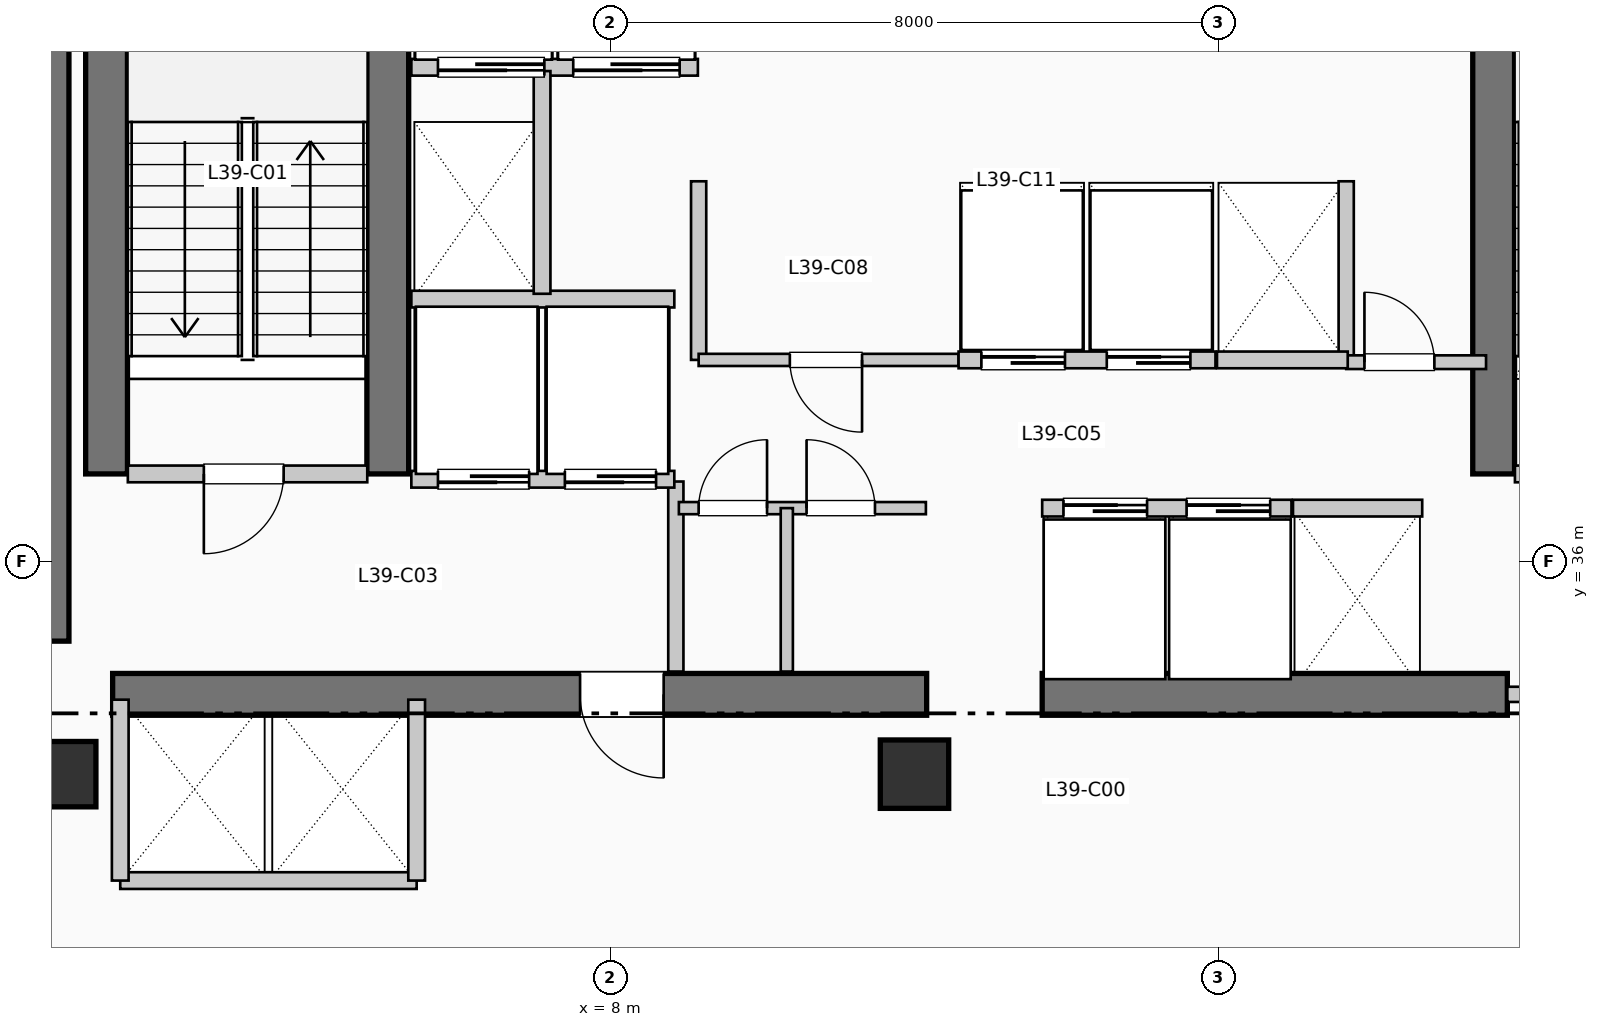
"""IFC4 building model, lengths in metres.
Left out: names, types, materials, properties, quantities, classifications, styles, units other than length and angle.
Written with IfcOpenShell. Run it as: python <this file> out.ifc"""

import sys

from ifc_helpers import new_model, si_unit, direction, frame, frame_2d, origin, origin_2d, place, context, subcontext, project, spatial, rectangle, extrude, element, fill, save


model = new_model("IFC4")
c1 = context("Model", 3, precision=1e-05, world=origin(), true_north=direction((0.0, 1.0)))
c2 = subcontext(c1, "Body", "Model", "MODEL_VIEW")
j1 = project(units=[si_unit("LENGTHUNIT", "METRE"), si_unit("PLANEANGLEUNIT", "RADIAN")], contexts=[c1])
p1 = place(None, origin())
s1 = spatial("IfcSite", under=j1, at=p1, CompositionType="ELEMENT")
p2 = place(p1, origin())
s2 = spatial("IfcBuilding", under=s1, at=p2, CompositionType="ELEMENT")
p3 = place(p2, frame((0.0, 0.0, 162.69)))
s3 = spatial("IfcBuildingStorey", under=s2, at=p3, CompositionType="ELEMENT", Elevation=162.69)
p4 = place(p3, frame((0.5, 34.95, 0.0), z_axis=(0.0, 0.0, 1.0), x_axis=(0.0, 1.0, 0.0)))
e1 = element("IfcWall", 1, at=p4, inside=s3, PredefinedType="SHEAR", context=c2, shape_type="SweptSolid", body=[
    extrude(rectangle(XDim=7.9, YDim=0.75, at=frame_2d((3.95, 0.0))), origin(), (0.0, 0.0, 1.0), 3.96),
])
p5 = place(p3, frame((1.45, 34.25, 0.0), z_axis=(0.0, 0.0, 1.0), x_axis=(1.0, 0.0, 0.0)))
e2 = element("IfcWall", 2, at=p5, inside=s3, PredefinedType="SHEAR", context=c2, shape_type="SweptSolid", body=[
    extrude(rectangle(XDim=10.71, YDim=0.55, at=frame_2d((5.355, 0.0))), origin(), (0.0, 0.0, 1.0), 3.96),
])
p6 = place(p5, frame((7.25, 0.0, 0.0), z_axis=(0.0, 0.0, 1.0), x_axis=(-1.0, 0.0, 0.0)))
e3 = element("IfcOpeningElement", 3, at=p6, cuts=e2, PredefinedType="OPENING", context=c2, shape_type="SweptSolid", body=[
    extrude(rectangle(XDim=1.1, YDim=2.15, at=frame_2d((0.55, 1.075))), frame((0.0, 0.285, 0.0), z_axis=(0.0, -1.0, 0.0), x_axis=(1.0, 0.0, 0.0)), (0.0, 0.0, 1.0), 0.57),
])
p7 = place(p3, frame((13.68, 34.25, 0.0), z_axis=(0.0, 0.0, 1.0), x_axis=(1.0, 0.0, 0.0)))
e4 = element("IfcWall", 4, at=p7, inside=s3, PredefinedType="SHEAR", context=c2, shape_type="SweptSolid", body=[
    extrude(rectangle(XDim=6.12, YDim=0.55, at=frame_2d((3.06, 0.0))), origin(), (0.0, 0.0, 1.0), 3.96),
])
for number, where, z_axis, x_axis in (
    (5, (1.37, 37.15, 0.0), (0.0, 0.0, 1.0), (0.0, 1.0, 0.0)),
    (6, (5.07, 37.15, 0.0), (0.0, 0.0, 1.0), (0.0, 1.0, 0.0)),
    (7, (19.62, 37.15, 0.0), (0.0, 0.0, 1.0), (0.0, 1.0, 0.0)),
):
    element("IfcWall", number, at=place(p3, frame(where, z_axis=z_axis, x_axis=x_axis)), inside=s3, PredefinedType="SHEAR", context=c2, shape_type="SweptSolid", body=[
        extrude(rectangle(XDim=7.89, YDim=0.55, at=frame_2d((3.945, 0.0))), origin(), (0.0, 0.0, 1.0), 3.96),
    ])
p8 = place(p3, frame((0.8, 33.2, 0.0), z_axis=(0.0, 0.0, 1.0), x_axis=(1.0, 0.0, 0.0)))
e8 = element("IfcColumn", 8, at=p8, inside=s3, PredefinedType="COLUMN", context=c2, shape_type="SweptSolid", body=[
    extrude(rectangle(XDim=0.86, YDim=0.86, at=origin_2d()), origin(), (0.0, 0.0, 1.0), 3.96),
])
p9 = place(p3, frame((12.0, 33.2, 0.0), z_axis=(0.0, 0.0, 1.0), x_axis=(1.0, 0.0, 0.0)))
e9 = element("IfcColumn", 9, at=p9, inside=s3, PredefinedType="COLUMN", context=c2, shape_type="SweptSolid", body=[
    extrude(rectangle(XDim=0.9, YDim=0.9, at=origin_2d()), origin(), (0.0, 0.0, 1.0), 3.96),
])
p10 = place(p3, frame((1.65, 37.15, 0.0), z_axis=(0.0, 0.0, 1.0), x_axis=(1.0, 0.0, 0.0)))
e10 = element("IfcWall", 10, at=p10, inside=s3, PredefinedType="PARTITIONING", context=c2, shape_type="SweptSolid", body=[
    extrude(rectangle(XDim=3.15, YDim=0.22, at=frame_2d((1.575, 0.0))), origin(), (0.0, 0.0, 1.0), 3.71),
])
p11 = place(p10, frame((2.05, 0.0, 0.0), z_axis=(0.0, 0.0, 1.0), x_axis=(-1.0, 0.0, 0.0)))
e11 = element("IfcOpeningElement", 11, at=p11, cuts=e10, PredefinedType="OPENING", context=c2, shape_type="SweptSolid", body=[
    extrude(rectangle(XDim=1.05, YDim=2.15, at=frame_2d((0.525, 1.075))), frame((0.0, 0.12, 0.0), z_axis=(0.0, -1.0, 0.0), x_axis=(1.0, 0.0, 0.0)), (0.0, 0.0, 1.0), 0.24),
])
p12 = place(p3, frame((8.86, 34.55, 0.0), z_axis=(0.0, 0.0, 1.0), x_axis=(0.0, 1.0, 0.0)))
e12 = element("IfcWall", 12, at=p12, inside=s3, PredefinedType="PARTITIONING", context=c2, shape_type="SweptSolid", body=[
    extrude(rectangle(XDim=2.5, YDim=0.2, at=frame_2d((1.25, 0.0))), origin(), (0.0, 0.0, 1.0), 3.71),
])
p13 = place(p3, frame((19.9, 37.15, 0.0), z_axis=(0.0, 0.0, 1.0), x_axis=(1.0, 0.0, 0.0)))
e13 = element("IfcWall", 13, at=p13, inside=s3, PredefinedType="PARTITIONING", context=c2, shape_type="SweptSolid", body=[
    extrude(rectangle(XDim=3.15, YDim=0.22, at=frame_2d((1.575, 0.0))), origin(), (0.0, 0.0, 1.0), 3.71),
])
p14 = place(p13, frame((2.05, 0.0, 0.0), z_axis=(0.0, 0.0, 1.0), x_axis=(-1.0, 0.0, 0.0)))
e14 = element("IfcOpeningElement", 14, at=p14, cuts=e13, PredefinedType="OPENING", context=c2, shape_type="SweptSolid", body=[
    extrude(rectangle(XDim=1.05, YDim=2.15, at=frame_2d((0.525, 1.075))), frame((0.0, 0.12, 0.0), z_axis=(0.0, -1.0, 0.0), x_axis=(1.0, 0.0, 0.0)), (0.0, 0.0, 1.0), 0.24),
])
p15 = place(p3, frame((19.8, 34.25, 0.0), z_axis=(0.0, 0.0, 1.0), x_axis=(1.0, 0.0, 0.0)))
e15 = element("IfcWall", 15, at=p15, inside=s3, PredefinedType="PARTITIONING", context=c2, shape_type="SweptSolid", body=[
    extrude(rectangle(XDim=3.25, YDim=0.2, at=frame_2d((1.625, 0.0))), origin(), (0.0, 0.0, 1.0), 3.71),
])
p16 = place(p15, frame((2.15, 0.0, 0.0), z_axis=(0.0, 0.0, 1.0), x_axis=(-1.0, 0.0, 0.0)))
e16 = element("IfcOpeningElement", 16, at=p16, cuts=e15, PredefinedType="OPENING", context=c2, shape_type="SweptSolid", body=[
    extrude(rectangle(XDim=1.1, YDim=2.15, at=frame_2d((0.55, 1.075))), frame((0.0, 0.11, 0.0), z_axis=(0.0, -1.0, 0.0), x_axis=(1.0, 0.0, 0.0)), (0.0, 0.0, 1.0), 0.22),
])
p17 = place(p3, frame((5.38, 37.08, 0.0), z_axis=(0.0, 0.0, 1.0), x_axis=(1.0, 0.0, 0.0)))
e17 = element("IfcWall", 17, at=p17, inside=s3, PredefinedType="PARTITIONING", context=c2, shape_type="SweptSolid", body=[
    extrude(rectangle(XDim=3.46, YDim=0.22, at=frame_2d((1.73, 0.0))), origin(), (0.0, 0.0, 1.0), 3.71),
])
p18 = place(p17, frame((1.55, 0.0, 0.0), z_axis=(0.0, 0.0, 1.0), x_axis=(-1.0, 0.0, 0.0)))
e18 = element("IfcOpeningElement", 18, at=p18, cuts=e17, PredefinedType="OPENING", context=c2, shape_type="SweptSolid", body=[
    extrude(rectangle(XDim=1.2, YDim=2.2, at=frame_2d((0.6, 1.1))), frame((0.0, 0.12, 0.0), z_axis=(0.0, -1.0, 0.0), x_axis=(1.0, 0.0, 0.0)), (0.0, 0.0, 1.0), 0.24),
])
p19 = place(p17, frame((3.22, 0.0, 0.0), z_axis=(0.0, 0.0, 1.0), x_axis=(-1.0, 0.0, 0.0)))
e19 = element("IfcOpeningElement", 19, at=p19, cuts=e17, PredefinedType="OPENING", context=c2, shape_type="SweptSolid", body=[
    extrude(rectangle(XDim=1.2, YDim=2.2, at=frame_2d((0.6, 1.1))), frame((0.0, 0.12, 0.0), z_axis=(0.0, -1.0, 0.0), x_axis=(1.0, 0.0, 0.0)), (0.0, 0.0, 1.0), 0.24),
])
p20 = place(p3, frame((5.38, 39.45, 0.0), z_axis=(0.0, 0.0, 1.0), x_axis=(1.0, 0.0, 0.0)))
e20 = element("IfcWall", 20, at=p20, inside=s3, PredefinedType="PARTITIONING", context=c2, shape_type="SweptSolid", body=[
    extrude(rectangle(XDim=3.46, YDim=0.22, at=frame_2d((1.73, 0.0))), origin(), (0.0, 0.0, 1.0), 3.71),
])
p21 = place(p3, frame((5.38, 42.5, 0.0), z_axis=(0.0, 0.0, 1.0), x_axis=(1.0, 0.0, 0.0)))
e21 = element("IfcWall", 21, at=p21, inside=s3, PredefinedType="PARTITIONING", context=c2, shape_type="SweptSolid", body=[
    extrude(rectangle(XDim=3.77, YDim=0.22, at=frame_2d((1.885, 0.0))), origin(), (0.0, 0.0, 1.0), 3.71),
])
p22 = place(p21, frame((1.75, 0.0, 0.0), z_axis=(0.0, 0.0, 1.0), x_axis=(-1.0, 0.0, 0.0)))
e22 = element("IfcOpeningElement", 22, at=p22, cuts=e21, PredefinedType="OPENING", context=c2, shape_type="SweptSolid", body=[
    extrude(rectangle(XDim=1.4, YDim=2.2, at=frame_2d((0.7, 1.1))), frame((0.0, 0.12, 0.0), z_axis=(0.0, -1.0, 0.0), x_axis=(1.0, 0.0, 0.0)), (0.0, 0.0, 1.0), 0.24),
])
p23 = place(p21, frame((3.53, 0.0, 0.0), z_axis=(0.0, 0.0, 1.0), x_axis=(-1.0, 0.0, 0.0)))
e23 = element("IfcOpeningElement", 23, at=p23, cuts=e21, PredefinedType="OPENING", context=c2, shape_type="SweptSolid", body=[
    extrude(rectangle(XDim=1.4, YDim=2.2, at=frame_2d((0.7, 1.1))), frame((0.0, 0.12, 0.0), z_axis=(0.0, -1.0, 0.0), x_axis=(1.0, 0.0, 0.0)), (0.0, 0.0, 1.0), 0.24),
])
p24 = place(p3, frame((7.1, 39.52, 0.0), z_axis=(0.0, 0.0, 1.0), x_axis=(0.0, 1.0, 0.0)))
e24 = element("IfcWall", 24, at=p24, inside=s3, PredefinedType="PARTITIONING", context=c2, shape_type="SweptSolid", body=[
    extrude(rectangle(XDim=2.93, YDim=0.22, at=frame_2d((1.465, 0.0))), origin(), (0.0, 0.0, 1.0), 3.71),
])
p25 = place(p3, frame((1.55, 31.8, 0.0), z_axis=(0.0, 0.0, 1.0), x_axis=(1.0, 0.0, 0.0)))
e25 = element("IfcWall", 25, at=p25, inside=s3, PredefinedType="PARTITIONING", context=c2, shape_type="SweptSolid", body=[
    extrude(rectangle(XDim=3.9, YDim=0.22, at=frame_2d((1.95, 0.0))), origin(), (0.0, 0.0, 1.0), 3.71),
])
for number, where, z_axis, x_axis in (
    (26, (1.55, 31.8, 0.0), (0.0, 0.0, 1.0), (0.0, 1.0, 0.0)),
    (27, (5.45, 31.8, 0.0), (0.0, 0.0, 1.0), (0.0, 1.0, 0.0)),
):
    element("IfcWall", number, at=place(p3, frame(where, z_axis=z_axis, x_axis=x_axis)), inside=s3, PredefinedType="PARTITIONING", context=c2, shape_type="SweptSolid", body=[
        extrude(rectangle(XDim=2.38, YDim=0.22, at=frame_2d((1.19, 0.0))), origin(), (0.0, 0.0, 1.0), 3.71),
    ])
for number, where, z_axis, x_axis in (
    (28, (9.16, 38.65, 0.0), (0.0, 0.0, 1.0), (0.0, 1.0, 0.0)),
    (29, (17.68, 38.65, 0.0), (0.0, 0.0, 1.0), (0.0, 1.0, 0.0)),
):
    element("IfcWall", number, at=place(p3, frame(where, z_axis=z_axis, x_axis=x_axis)), inside=s3, PredefinedType="PARTITIONING", context=c2, shape_type="SweptSolid", body=[
        extrude(rectangle(XDim=2.35, YDim=0.2, at=frame_2d((1.175, 0.0))), origin(), (0.0, 0.0, 1.0), 3.71),
    ])
p26 = place(p3, frame((17.68, 38.62, 0.0), z_axis=(0.0, 0.0, 1.0), x_axis=(1.0, 0.0, 0.0)))
e30 = element("IfcWall", 30, at=p26, inside=s3, PredefinedType="PARTITIONING", context=c2, shape_type="SweptSolid", body=[
    extrude(rectangle(XDim=1.84, YDim=0.18, at=frame_2d((0.92, 0.0))), origin(), (0.0, 0.0, 1.0), 3.71),
])
p27 = place(p26, frame((0.24, 0.0, 0.0)))
e31 = element("IfcOpeningElement", 31, at=p27, cuts=e30, PredefinedType="OPENING", context=c2, shape_type="SweptSolid", body=[
    extrude(rectangle(XDim=0.92, YDim=2.1, at=frame_2d((0.46, 1.05))), frame((0.0, 0.1, 0.0), z_axis=(0.0, -1.0, 0.0), x_axis=(1.0, 0.0, 0.0)), (0.0, 0.0, 1.0), 0.2),
])
p28 = place(p3, frame((8.9, 36.7, 0.0), z_axis=(0.0, 0.0, 1.0), x_axis=(1.0, 0.0, 0.0)))
e32 = element("IfcWall", 32, at=p28, inside=s3, PredefinedType="PARTITIONING", context=c2, shape_type="SweptSolid", body=[
    extrude(rectangle(XDim=3.25, YDim=0.16, at=frame_2d((1.625, 0.0))), origin(), (0.0, 0.0, 1.0), 3.71),
])
p29 = place(p28, frame((0.26, 0.0, 0.0)))
e33 = element("IfcOpeningElement", 33, at=p29, cuts=e32, PredefinedType="OPENING", context=c2, shape_type="SweptSolid", body=[
    extrude(rectangle(XDim=0.9, YDim=2.15, at=frame_2d((0.45, 1.075))), frame((0.0, 0.09, 0.0), z_axis=(0.0, -1.0, 0.0), x_axis=(1.0, 0.0, 0.0)), (0.0, 0.0, 1.0), 0.18),
])
p30 = place(p28, frame((1.68, 0.0, 0.0)))
e34 = element("IfcOpeningElement", 34, at=p30, cuts=e32, PredefinedType="OPENING", context=c2, shape_type="SweptSolid", body=[
    extrude(rectangle(XDim=0.9, YDim=2.15, at=frame_2d((0.45, 1.075))), frame((0.0, 0.09, 0.0), z_axis=(0.0, -1.0, 0.0), x_axis=(1.0, 0.0, 0.0)), (0.0, 0.0, 1.0), 0.18),
])
p31 = place(p3, frame((10.32, 34.55, 0.0), z_axis=(0.0, 0.0, 1.0), x_axis=(0.0, 1.0, 0.0)))
e35 = element("IfcWall", 35, at=p31, inside=s3, PredefinedType="PARTITIONING", context=c2, shape_type="SweptSolid", body=[
    extrude(rectangle(XDim=2.15, YDim=0.16, at=frame_2d((1.075, 0.0))), origin(), (0.0, 0.0, 1.0), 3.71),
])
p32 = place(p3, frame((9.16, 38.65, 0.0), z_axis=(0.0, 0.0, 1.0), x_axis=(1.0, 0.0, 0.0)))
e36 = element("IfcWall", 36, at=p32, inside=s3, PredefinedType="PARTITIONING", context=c2, shape_type="SweptSolid", body=[
    extrude(rectangle(XDim=3.42, YDim=0.16, at=frame_2d((1.71, 0.0))), origin(), (0.0, 0.0, 1.0), 3.71),
])
p33 = place(p32, frame((2.15, 0.0, 0.0), z_axis=(0.0, 0.0, 1.0), x_axis=(-1.0, 0.0, 0.0)))
e37 = element("IfcOpeningElement", 37, at=p33, cuts=e36, PredefinedType="OPENING", context=c2, shape_type="SweptSolid", body=[
    extrude(rectangle(XDim=0.95, YDim=2.15, at=frame_2d((0.475, 1.075))), frame((0.0, 0.09, 0.0), z_axis=(0.0, -1.0, 0.0), x_axis=(1.0, 0.0, 0.0)), (0.0, 0.0, 1.0), 0.18),
])
p34 = place(p3, frame((13.68, 36.7, 0.0), z_axis=(0.0, 0.0, 1.0), x_axis=(1.0, 0.0, 0.0)))
e38 = element("IfcWall", 38, at=p34, inside=s3, PredefinedType="PARTITIONING", context=c2, shape_type="SweptSolid", body=[
    extrude(rectangle(XDim=3.28, YDim=0.22, at=frame_2d((1.64, 0.0))), origin(), (0.0, 0.0, 1.0), 3.71),
])
p35 = place(p34, frame((0.28, 0.0, 0.0)))
e39 = element("IfcOpeningElement", 39, at=p35, cuts=e38, PredefinedType="OPENING", context=c2, shape_type="SweptSolid", body=[
    extrude(rectangle(XDim=1.1, YDim=2.2, at=frame_2d((0.55, 1.1))), frame((0.0, 0.12, 0.0), z_axis=(0.0, -1.0, 0.0), x_axis=(1.0, 0.0, 0.0)), (0.0, 0.0, 1.0), 0.24),
])
p36 = place(p34, frame((1.9, 0.0, 0.0)))
e40 = element("IfcOpeningElement", 40, at=p36, cuts=e38, PredefinedType="OPENING", context=c2, shape_type="SweptSolid", body=[
    extrude(rectangle(XDim=1.1, YDim=2.2, at=frame_2d((0.55, 1.1))), frame((0.0, 0.12, 0.0), z_axis=(0.0, -1.0, 0.0), x_axis=(1.0, 0.0, 0.0)), (0.0, 0.0, 1.0), 0.24),
])
p37 = place(p3, frame((12.58, 38.65, 0.0), z_axis=(0.0, 0.0, 1.0), x_axis=(1.0, 0.0, 0.0)))
e41 = element("IfcWall", 41, at=p37, inside=s3, PredefinedType="PARTITIONING", context=c2, shape_type="SweptSolid", body=[
    extrude(rectangle(XDim=3.38, YDim=0.22, at=frame_2d((1.69, 0.0))), origin(), (0.0, 0.0, 1.0), 3.71),
])
p38 = place(p37, frame((0.3, 0.0, 0.0)))
e42 = element("IfcOpeningElement", 42, at=p38, cuts=e41, PredefinedType="OPENING", context=c2, shape_type="SweptSolid", body=[
    extrude(rectangle(XDim=1.1, YDim=2.2, at=frame_2d((0.55, 1.1))), frame((0.0, 0.12, 0.0), z_axis=(0.0, -1.0, 0.0), x_axis=(1.0, 0.0, 0.0)), (0.0, 0.0, 1.0), 0.24),
])
p39 = place(p37, frame((1.95, 0.0, 0.0)))
e43 = element("IfcOpeningElement", 43, at=p39, cuts=e41, PredefinedType="OPENING", context=c2, shape_type="SweptSolid", body=[
    extrude(rectangle(XDim=1.1, YDim=2.2, at=frame_2d((0.55, 1.1))), frame((0.0, 0.12, 0.0), z_axis=(0.0, -1.0, 0.0), x_axis=(1.0, 0.0, 0.0)), (0.0, 0.0, 1.0), 0.24),
])
p40 = place(p3, frame((16.98, 36.7, 0.0), z_axis=(0.0, 0.0, 1.0), x_axis=(1.0, 0.0, 0.0)))
e44 = element("IfcWall", 44, at=p40, inside=s3, PredefinedType="PARTITIONING", context=c2, shape_type="SweptSolid", body=[
    extrude(rectangle(XDim=1.7, YDim=0.22, at=frame_2d((0.85, 0.0))), origin(), (0.0, 0.0, 1.0), 3.71),
])
p41 = place(p3, frame((15.98, 38.65, 0.0), z_axis=(0.0, 0.0, 1.0), x_axis=(1.0, 0.0, 0.0)))
e45 = element("IfcWall", 45, at=p41, inside=s3, PredefinedType="PARTITIONING", context=c2, shape_type="SweptSolid", body=[
    extrude(rectangle(XDim=1.72, YDim=0.22, at=frame_2d((0.86, 0.0))), origin(), (0.0, 0.0, 1.0), 3.71),
])
p42 = place(p11, origin())
e46 = element("IfcDoor", 46, at=p42, inside=s3, OperationType="SINGLE_SWING_LEFT", PredefinedType="DOOR", context=c2, shape_type="SweptSolid", body=[
    extrude(rectangle(XDim=1.05, YDim=2.15, at=frame_2d((0.525, 1.075))), frame((0.0, 0.025, 0.0), z_axis=(0.0, -1.0, 0.0), x_axis=(1.0, 0.0, 0.0)), (0.0, 0.0, 1.0), 0.05),
])
fill(e11, e46)
p43 = place(p6, origin())
e47 = element("IfcDoor", 47, at=p43, inside=s3, OperationType="SINGLE_SWING_RIGHT", PredefinedType="DOOR", context=c2, shape_type="SweptSolid", body=[
    extrude(rectangle(XDim=1.1, YDim=2.15, at=frame_2d((0.55, 1.075))), frame((0.0, 0.025, 0.0), z_axis=(0.0, -1.0, 0.0), x_axis=(1.0, 0.0, 0.0)), (0.0, 0.0, 1.0), 0.05),
])
fill(e3, e47)
p44 = place(p18, origin())
e48 = element("IfcDoor", 48, at=p44, inside=s3, OperationType="SLIDING_TO_RIGHT", PredefinedType="DOOR", context=c2, shape_type="SweptSolid", body=[
    extrude(rectangle(XDim=1.2, YDim=2.2, at=frame_2d((0.6, 1.1))), frame((0.0, 0.025, 0.0), z_axis=(0.0, -1.0, 0.0), x_axis=(1.0, 0.0, 0.0)), (0.0, 0.0, 1.0), 0.05),
])
fill(e18, e48)
p45 = place(p19, origin())
e49 = element("IfcDoor", 49, at=p45, inside=s3, OperationType="SLIDING_TO_RIGHT", PredefinedType="DOOR", context=c2, shape_type="SweptSolid", body=[
    extrude(rectangle(XDim=1.2, YDim=2.2, at=frame_2d((0.6, 1.1))), frame((0.0, 0.025, 0.0), z_axis=(0.0, -1.0, 0.0), x_axis=(1.0, 0.0, 0.0)), (0.0, 0.0, 1.0), 0.05),
])
fill(e19, e49)
p46 = place(p22, origin())
e50 = element("IfcDoor", 50, at=p46, inside=s3, OperationType="SLIDING_TO_LEFT", PredefinedType="DOOR", context=c2, shape_type="SweptSolid", body=[
    extrude(rectangle(XDim=1.4, YDim=2.2, at=frame_2d((0.7, 1.1))), frame((0.0, 0.025, 0.0), z_axis=(0.0, -1.0, 0.0), x_axis=(1.0, 0.0, 0.0)), (0.0, 0.0, 1.0), 0.05),
])
fill(e22, e50)
p47 = place(p23, origin())
e51 = element("IfcDoor", 51, at=p47, inside=s3, OperationType="SLIDING_TO_LEFT", PredefinedType="DOOR", context=c2, shape_type="SweptSolid", body=[
    extrude(rectangle(XDim=1.4, YDim=2.2, at=frame_2d((0.7, 1.1))), frame((0.0, 0.025, 0.0), z_axis=(0.0, -1.0, 0.0), x_axis=(1.0, 0.0, 0.0)), (0.0, 0.0, 1.0), 0.05),
])
fill(e23, e51)
p48 = place(p27, origin())
e52 = element("IfcDoor", 52, at=p48, inside=s3, OperationType="SINGLE_SWING_LEFT", PredefinedType="DOOR", context=c2, shape_type="SweptSolid", body=[
    extrude(rectangle(XDim=0.92, YDim=2.1, at=frame_2d((0.46, 1.05))), frame((0.0, 0.025, 0.0), z_axis=(0.0, -1.0, 0.0), x_axis=(1.0, 0.0, 0.0)), (0.0, 0.0, 1.0), 0.05),
])
fill(e31, e52)
p49 = place(p29, origin())
e53 = element("IfcDoor", 53, at=p49, inside=s3, OperationType="SINGLE_SWING_RIGHT", PredefinedType="DOOR", context=c2, shape_type="SweptSolid", body=[
    extrude(rectangle(XDim=0.9, YDim=2.15, at=frame_2d((0.45, 1.075))), frame((0.0, 0.025, 0.0), z_axis=(0.0, -1.0, 0.0), x_axis=(1.0, 0.0, 0.0)), (0.0, 0.0, 1.0), 0.05),
])
fill(e33, e53)
p50 = place(p30, origin())
e54 = element("IfcDoor", 54, at=p50, inside=s3, OperationType="SINGLE_SWING_LEFT", PredefinedType="DOOR", context=c2, shape_type="SweptSolid", body=[
    extrude(rectangle(XDim=0.9, YDim=2.15, at=frame_2d((0.45, 1.075))), frame((0.0, 0.025, 0.0), z_axis=(0.0, -1.0, 0.0), x_axis=(1.0, 0.0, 0.0)), (0.0, 0.0, 1.0), 0.05),
])
fill(e34, e54)
p51 = place(p33, origin())
e55 = element("IfcDoor", 55, at=p51, inside=s3, OperationType="SINGLE_SWING_RIGHT", PredefinedType="DOOR", context=c2, shape_type="SweptSolid", body=[
    extrude(rectangle(XDim=0.95, YDim=2.15, at=frame_2d((0.475, 1.075))), frame((0.0, 0.025, 0.0), z_axis=(0.0, -1.0, 0.0), x_axis=(1.0, 0.0, 0.0)), (0.0, 0.0, 1.0), 0.05),
])
fill(e37, e55)
p52 = place(p35, origin())
e56 = element("IfcDoor", 56, at=p52, inside=s3, OperationType="SLIDING_TO_RIGHT", PredefinedType="DOOR", context=c2, shape_type="SweptSolid", body=[
    extrude(rectangle(XDim=1.1, YDim=2.2, at=frame_2d((0.55, 1.1))), frame((0.0, 0.025, 0.0), z_axis=(0.0, -1.0, 0.0), x_axis=(1.0, 0.0, 0.0)), (0.0, 0.0, 1.0), 0.05),
])
fill(e39, e56)
p53 = place(p36, origin())
e57 = element("IfcDoor", 57, at=p53, inside=s3, OperationType="SLIDING_TO_RIGHT", PredefinedType="DOOR", context=c2, shape_type="SweptSolid", body=[
    extrude(rectangle(XDim=1.1, YDim=2.2, at=frame_2d((0.55, 1.1))), frame((0.0, 0.025, 0.0), z_axis=(0.0, -1.0, 0.0), x_axis=(1.0, 0.0, 0.0)), (0.0, 0.0, 1.0), 0.05),
])
fill(e40, e57)
p54 = place(p38, origin())
e58 = element("IfcDoor", 58, at=p54, inside=s3, OperationType="SLIDING_TO_RIGHT", PredefinedType="DOOR", context=c2, shape_type="SweptSolid", body=[
    extrude(rectangle(XDim=1.1, YDim=2.2, at=frame_2d((0.55, 1.1))), frame((0.0, 0.025, 0.0), z_axis=(0.0, -1.0, 0.0), x_axis=(1.0, 0.0, 0.0)), (0.0, 0.0, 1.0), 0.05),
])
fill(e42, e58)
p55 = place(p39, origin())
e59 = element("IfcDoor", 59, at=p55, inside=s3, OperationType="SLIDING_TO_RIGHT", PredefinedType="DOOR", context=c2, shape_type="SweptSolid", body=[
    extrude(rectangle(XDim=1.1, YDim=2.2, at=frame_2d((0.55, 1.1))), frame((0.0, 0.025, 0.0), z_axis=(0.0, -1.0, 0.0), x_axis=(1.0, 0.0, 0.0)), (0.0, 0.0, 1.0), 0.05),
])
fill(e43, e59)
save(model, sys.argv[1])
